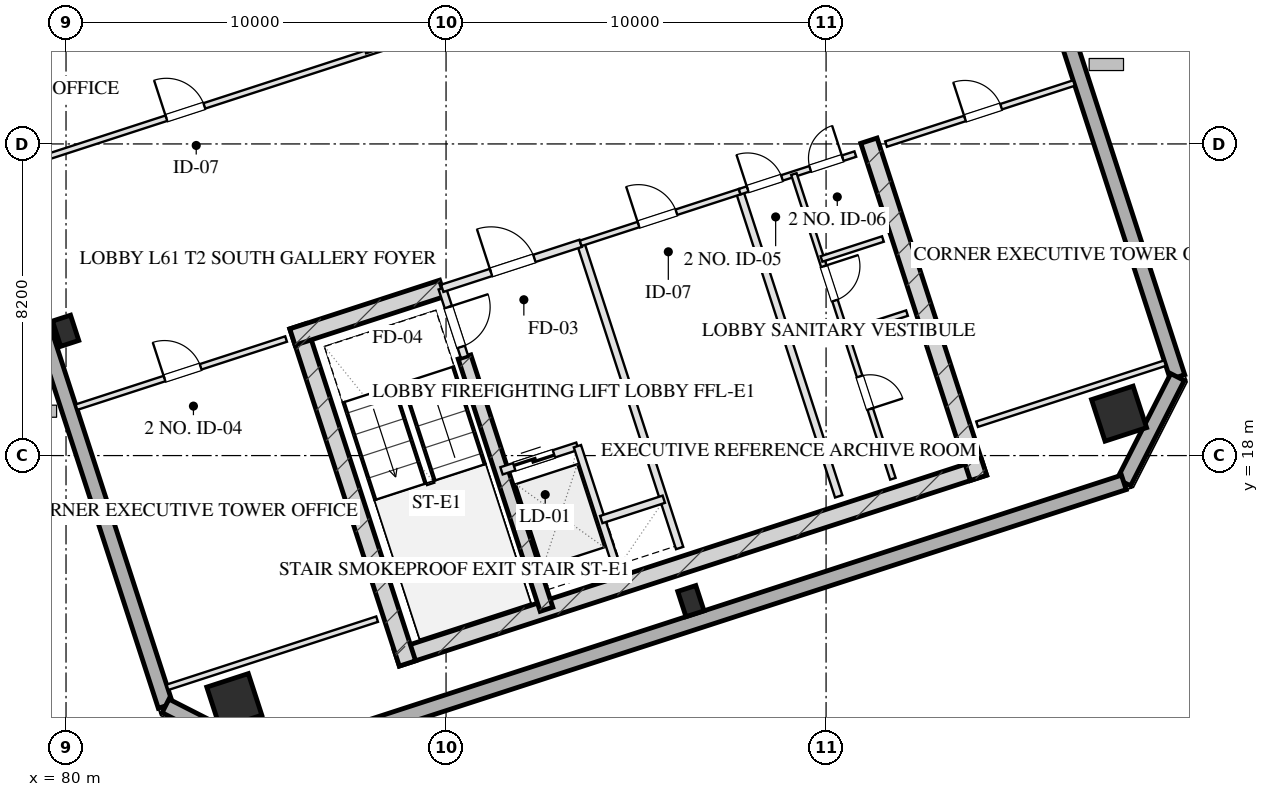
"""IFC4 building model, lengths in metres.
Left out: names, types, materials, properties, quantities, classifications, styles, units other than length and angle.
Written with IfcOpenShell. Run it as: python <this file> out.ifc"""

import sys

from ifc_helpers import new_model, si_unit, direction, frame, frame_2d, origin, origin_2d, place, context, subcontext, project, spatial, rectangle, hollow_rectangle, extrude, element, fill, save


model = new_model("IFC4")
c1 = context("Model", 3, precision=1e-05, world=origin(), true_north=direction((0.0, 1.0)))
c2 = subcontext(c1, "Body", "Model", "MODEL_VIEW")
j1 = project(units=[si_unit("LENGTHUNIT", "METRE"), si_unit("PLANEANGLEUNIT", "RADIAN")], contexts=[c1])
p1 = place(None, origin())
s1 = spatial("IfcSite", under=j1, at=p1, CompositionType="ELEMENT")
p2 = place(p1, origin())
s2 = spatial("IfcBuilding", under=s1, at=p2, CompositionType="ELEMENT")
p3 = place(p2, frame((0.0, 0.0, 226.55)))
s3 = spatial("IfcBuildingStorey", under=s2, at=p3, CompositionType="ELEMENT", Elevation=226.55)
p4 = place(p3, frame((88.701, 12.675, 0.0), z_axis=(0.0, 0.0, 1.0), x_axis=(0.95105824505, 0.309011673763, 0.0)))
e1 = element("IfcWall", 1, at=p4, inside=s3, PredefinedType="SHEAR", context=c2, shape_type="SweptSolid", body=[
    extrude(rectangle(XDim=16.25, YDim=0.45, at=frame_2d((8.125, 0.0))), origin(), (0.0, 0.0, 1.0), 3.45),
])
for number, where, z_axis, x_axis in (
    (2, (86.102, 21.404, 0.0), (0.0, 0.0, 1.0), (0.309, -0.951, 0.0)),
    (3, (101.128, 26.286, 0.0), (0.0, 0.0, 1.0), (0.309, -0.951, 0.0)),
):
    element("IfcWall", number, at=place(p3, frame(where, z_axis=z_axis, x_axis=x_axis)), inside=s3, PredefinedType="SHEAR", context=c2, shape_type="SweptSolid", body=[
        extrude(rectangle(XDim=9.33, YDim=0.45, at=frame_2d((4.665, 0.0))), origin(), (0.0, 0.0, 1.0), 3.45),
    ])
p5 = place(p3, frame((90.486, 20.594, 0.0), z_axis=(0.0, 0.0, 1.0), x_axis=(0.309020428229, -0.951055400562, 0.0)))
e4 = element("IfcWall", 4, at=p5, inside=s3, PredefinedType="SHEAR", context=c2, shape_type="SweptSolid", body=[
    extrude(rectangle(XDim=6.98, YDim=0.35, at=frame_2d((3.49, 0.0))), origin(), (0.0, 0.0, 1.0), 3.45),
])
p6 = place(p3, frame((85.957, 21.12, 0.0), z_axis=(0.0, 0.0, 1.0), x_axis=(0.951064796122, 0.308991510526, 0.0)))
e5 = element("IfcWall", 5, at=p6, inside=s3, PredefinedType="SHEAR", context=c2, shape_type="SweptSolid", body=[
    extrude(rectangle(XDim=4.145, YDim=0.45, at=frame_2d((2.073, 0.0))), origin(), (0.0, 0.0, 1.0), 3.45),
])
for number, where, z_axis, x_axis in (
    (6, (84.428, 11.539, 0.0), (0.0, 0.0, 1.0), (0.951, 0.309, 0.0)),
    (7, (107.71, 19.104, 0.0), (0.0, 0.0, 1.0), (0.951, 0.309, 0.0)),
):
    element("IfcColumn", number, at=place(p3, frame(where, z_axis=z_axis, x_axis=x_axis)), inside=s3, PredefinedType="COLUMN", context=c2, shape_type="SweptSolid", body=[
        extrude(hollow_rectangle(XDim=1.15, YDim=1.15, WallThickness=0.04, at=origin_2d()), origin(), (0.0, 0.0, 1.0), 3.451),
    ])
for number, where, z_axis, x_axis in (
    (8, (79.99, 21.284, 0.0), (0.0, 0.0, 1.0), (0.951, 0.309, 0.0)),
    (9, (96.443, 14.17, 0.0), (0.0, 0.0, 1.0), (0.951, 0.309, 0.0)),
):
    element("IfcColumn", number, at=place(p3, frame(where, z_axis=z_axis, x_axis=x_axis)), inside=s3, PredefinedType="COLUMN", context=c2, shape_type="SweptSolid", body=[
        extrude(hollow_rectangle(XDim=0.5, YDim=0.7, WallThickness=0.025, at=origin_2d()), origin(), (0.0, 0.0, 1.0), 3.451),
    ])
p7 = place(p3, frame((82.618, 11.414, 0.0), z_axis=(0.0, 0.0, 1.0), x_axis=(-0.309016491071, 0.951056679828, 0.0)))
e10 = element("IfcWall", 10, at=p7, inside=s3, PredefinedType="SOLIDWALL", context=c2, shape_type="SweptSolid", body=[
    extrude(rectangle(XDim=38.4, YDim=0.4, at=frame_2d((19.2, 0.0))), origin(), (0.0, 0.0, 1.0), 2.55),
])
p8 = place(p7, frame((11.825, 0.0, 0.75)))
e11 = element("IfcOpeningElement", 11, at=p8, cuts=e10, PredefinedType="OPENING", context=c2, shape_type="SweptSolid", body=[
    extrude(rectangle(XDim=1.95, YDim=1.4, at=frame_2d((0.975, 0.7))), frame((0.0, 0.21, 0.0), z_axis=(0.0, -1.0, 0.0), x_axis=(1.0, 0.0, 0.0)), (0.0, 0.0, 1.0), 0.42),
])
p9 = place(p7, frame((15.625, 0.0, 0.75)))
e12 = element("IfcOpeningElement", 12, at=p9, cuts=e10, PredefinedType="OPENING", context=c2, shape_type="SweptSolid", body=[
    extrude(rectangle(XDim=1.95, YDim=1.4, at=frame_2d((0.975, 0.7))), frame((0.0, 0.21, 0.0), z_axis=(0.0, -1.0, 0.0), x_axis=(1.0, 0.0, 0.0)), (0.0, 0.0, 1.0), 0.42),
])
p10 = place(p7, frame((21.5, 0.0, 0.0)))
e13 = element("IfcOpeningElement", 13, at=p10, cuts=e10, PredefinedType="OPENING", context=c2, shape_type="SweptSolid", body=[
    extrude(rectangle(XDim=1.1, YDim=2.15, at=frame_2d((0.55, 1.075))), frame((0.0, 0.21, 0.0), z_axis=(0.0, -1.0, 0.0), x_axis=(1.0, 0.0, 0.0)), (0.0, 0.0, 1.0), 0.42),
])
p11 = place(p3, frame((97.382, 56.586, 0.0), z_axis=(0.0, 0.0, 1.0), x_axis=(0.309016491071, -0.951056679828, 0.0)))
e14 = element("IfcWall", 14, at=p11, inside=s3, PredefinedType="SOLIDWALL", context=c2, shape_type="SweptSolid", body=[
    extrude(rectangle(XDim=38.4, YDim=0.4, at=frame_2d((19.2, 0.0))), origin(), (0.0, 0.0, 1.0), 2.55),
])
p12 = place(p11, frame((24.625, 0.0, 0.75)))
e15 = element("IfcOpeningElement", 15, at=p12, cuts=e14, PredefinedType="OPENING", context=c2, shape_type="SweptSolid", body=[
    extrude(rectangle(XDim=1.95, YDim=1.4, at=frame_2d((0.975, 0.7))), frame((0.0, 0.21, 0.0), z_axis=(0.0, -1.0, 0.0), x_axis=(1.0, 0.0, 0.0)), (0.0, 0.0, 1.0), 0.42),
])
p13 = place(p11, frame((20.825, 0.0, 0.75)))
e16 = element("IfcOpeningElement", 16, at=p13, cuts=e14, PredefinedType="OPENING", context=c2, shape_type="SweptSolid", body=[
    extrude(rectangle(XDim=1.95, YDim=1.4, at=frame_2d((0.975, 0.7))), frame((0.0, 0.21, 0.0), z_axis=(0.0, -1.0, 0.0), x_axis=(1.0, 0.0, 0.0)), (0.0, 0.0, 1.0), 0.42),
])
p14 = place(p11, frame((15.8, 0.0, 0.0)))
e17 = element("IfcOpeningElement", 17, at=p14, cuts=e14, PredefinedType="OPENING", context=c2, shape_type="SweptSolid", body=[
    extrude(rectangle(XDim=1.1, YDim=2.15, at=frame_2d((0.55, 1.075))), frame((0.0, 0.21, 0.0), z_axis=(0.0, -1.0, 0.0), x_axis=(1.0, 0.0, 0.0)), (0.0, 0.0, 1.0), 0.42),
])
p15 = place(p3, frame((109.248, 20.066, 0.0), z_axis=(0.0, 0.0, 1.0), x_axis=(-0.453949291228, -0.891027519774, 0.0)))
e18 = element("IfcWall", 18, at=p15, inside=s3, PredefinedType="SOLIDWALL", context=c2, shape_type="SweptSolid", body=[
    extrude(rectangle(XDim=3.111, YDim=0.4, at=frame_2d((1.556, 0.0))), origin(), (0.0, 0.0, 1.0), 2.55),
])
p16 = place(p3, frame((107.835, 17.294, 0.0), z_axis=(0.0, 0.0, 1.0), x_axis=(-0.951058012937, -0.309012388148, 0.0)))
e19 = element("IfcWall", 19, at=p16, inside=s3, PredefinedType="SOLIDWALL", context=c2, shape_type="SweptSolid", body=[
    extrude(rectangle(XDim=23.6, YDim=0.4, at=frame_2d((11.8, 0.0))), origin(), (0.0, 0.0, 1.0), 2.55),
])
p17 = place(p3, frame((85.39, 10.001, 0.0), z_axis=(0.0, 0.0, 1.0), x_axis=(-0.890979603174, 0.454043331334, 0.0)))
e20 = element("IfcWall", 20, at=p17, inside=s3, PredefinedType="SOLIDWALL", context=c2, shape_type="SweptSolid", body=[
    extrude(rectangle(XDim=3.111, YDim=0.4, at=frame_2d((1.556, 0.0))), origin(), (0.0, 0.0, 1.0), 2.55),
])
p18 = place(p3, frame((89.899, 22.401, 0.0), z_axis=(0.0, 0.0, 1.0), x_axis=(0.308932062672, -0.951084108086, 0.0)))
e21 = element("IfcWall", 21, at=p18, inside=s3, PredefinedType="PARTITIONING", context=c2, shape_type="SweptSolid", body=[
    extrude(rectangle(XDim=1.9, YDim=0.2, at=frame_2d((0.95, 0.0))), origin(), (0.0, 0.0, 1.0), 3.155),
])
p19 = place(p18, frame((0.52, 0.0, 0.0)))
e22 = element("IfcOpeningElement", 22, at=p19, cuts=e21, PredefinedType="OPENING", context=c2, shape_type="SweptSolid", body=[
    extrude(rectangle(XDim=1.1, YDim=2.05, at=frame_2d((0.55, 1.025))), frame((0.0, 0.11, 0.0), z_axis=(0.0, -1.0, 0.0), x_axis=(1.0, 0.0, 0.0)), (0.0, 0.0, 1.0), 0.22),
])
p20 = place(p3, frame((93.542, 23.585, 0.0), z_axis=(0.0, 0.0, 1.0), x_axis=(0.309042196757, -0.951048327176, 0.0)))
e23 = element("IfcWall", 23, at=p20, inside=s3, PredefinedType="PARTITIONING", context=c2, shape_type="SweptSolid", body=[
    extrude(rectangle(XDim=8.43, YDim=0.2, at=frame_2d((4.215, 0.0))), origin(), (0.0, 0.0, 1.0), 3.155),
])
p21 = place(p3, frame((89.899, 22.401, 0.0), z_axis=(0.0, 0.0, 1.0), x_axis=(0.951046716504, 0.309047153403, 0.0)))
e24 = element("IfcWall", 24, at=p21, inside=s3, PredefinedType="PARTITIONING", context=c2, shape_type="SweptSolid", body=[
    extrude(rectangle(XDim=3.83, YDim=0.2, at=frame_2d((1.915, 0.0))), origin(), (0.0, 0.0, 1.0), 3.155),
])
p22 = place(p21, frame((1.35, 0.0, 0.0)))
e25 = element("IfcOpeningElement", 25, at=p22, cuts=e24, PredefinedType="OPENING", context=c2, shape_type="SweptSolid", body=[
    extrude(rectangle(XDim=1.2, YDim=2.05, at=frame_2d((0.6, 1.025))), frame((0.0, 0.11, 0.0), z_axis=(0.0, -1.0, 0.0), x_axis=(1.0, 0.0, 0.0)), (0.0, 0.0, 1.0), 0.22),
])
p23 = place(p3, frame((91.46, 17.598, 0.0), z_axis=(0.0, 0.0, 1.0), x_axis=(0.951062257173, 0.308999325213, 0.0)))
e26 = element("IfcWall", 26, at=p23, inside=s3, PredefinedType="PARTITIONING", context=c2, shape_type="SweptSolid", body=[
    extrude(rectangle(XDim=2.1, YDim=0.2, at=frame_2d((1.05, 0.0))), origin(), (0.0, 0.0, 1.0), 3.155),
])
p24 = place(p23, frame((0.35, 0.0, 0.0)))
e27 = element("IfcOpeningElement", 27, at=p24, cuts=e26, PredefinedType="OPENING", context=c2, shape_type="SweptSolid", body=[
    extrude(rectangle(XDim=1.1, YDim=2.05, at=frame_2d((0.55, 1.025))), frame((0.0, 0.11, 0.0), z_axis=(0.0, -1.0, 0.0), x_axis=(1.0, 0.0, 0.0)), (0.0, 0.0, 1.0), 0.22),
])
p25 = place(p3, frame((93.457, 18.247, 0.0), z_axis=(0.0, 0.0, 1.0), x_axis=(0.3089935693, -0.951064127245, 0.0)))
e28 = element("IfcWall", 28, at=p25, inside=s3, PredefinedType="PARTITIONING", context=c2, shape_type="SweptSolid", body=[
    extrude(rectangle(XDim=3.7, YDim=0.2, at=frame_2d((1.85, 0.0))), origin(), (0.0, 0.0, 1.0), 3.155),
])
p26 = place(p3, frame((94.084, 16.317, 0.0), z_axis=(0.0, 0.0, 1.0), x_axis=(0.951041328149, 0.309063734775, 0.0)))
e29 = element("IfcWall", 29, at=p26, inside=s3, PredefinedType="PARTITIONING", context=c2, shape_type="SweptSolid", body=[
    extrude(rectangle(XDim=1.73, YDim=0.2, at=frame_2d((0.865, 0.0))), origin(), (0.0, 0.0, 1.0), 3.155),
])
p27 = place(p3, frame((97.727, 24.944, 0.0), z_axis=(0.0, 0.0, 1.0), x_axis=(0.309016001439, -0.951056838919, 0.0)))
e30 = element("IfcWall", 30, at=p27, inside=s3, PredefinedType="PARTITIONING", context=c2, shape_type="SweptSolid", body=[
    extrude(rectangle(XDim=8.43, YDim=0.2, at=frame_2d((4.215, 0.0))), origin(), (0.0, 0.0, 1.0), 3.155),
])
p28 = place(p3, frame((93.542, 23.585, 0.0), z_axis=(0.0, 0.0, 1.0), x_axis=(0.951063829732, 0.308994485023, 0.0)))
e31 = element("IfcWall", 31, at=p28, inside=s3, PredefinedType="PARTITIONING", context=c2, shape_type="SweptSolid", body=[
    extrude(rectangle(XDim=4.4, YDim=0.15, at=frame_2d((2.2, 0.0))), origin(), (0.0, 0.0, 1.0), 3.155),
])
p29 = place(p28, frame((1.6, 0.0, 0.0)))
e32 = element("IfcOpeningElement", 32, at=p29, cuts=e31, PredefinedType="OPENING", context=c2, shape_type="SweptSolid", body=[
    extrude(rectangle(XDim=1.05, YDim=2.05, at=frame_2d((0.525, 1.025))), frame((0.0, 0.085, 0.0), z_axis=(0.0, -1.0, 0.0), x_axis=(1.0, 0.0, 0.0)), (0.0, 0.0, 1.0), 0.17),
])
p30 = place(p3, frame((97.727, 24.944, 0.0), z_axis=(0.0, 0.0, 1.0), x_axis=(0.951036872128, 0.309077446369, 0.0)))
e33 = element("IfcWall", 33, at=p30, inside=s3, PredefinedType="PARTITIONING", context=c2, shape_type="SweptSolid", body=[
    extrude(rectangle(XDim=3.2, YDim=0.15, at=frame_2d((1.6, 0.0))), origin(), (0.0, 0.0, 1.0), 3.155),
])
p31 = place(p30, frame((0.22, 0.0, 0.0)))
e34 = element("IfcOpeningElement", 34, at=p31, cuts=e33, PredefinedType="OPENING", context=c2, shape_type="SweptSolid", body=[
    extrude(rectangle(XDim=0.95, YDim=2.05, at=frame_2d((0.475, 1.025))), frame((0.0, 0.085, 0.0), z_axis=(0.0, -1.0, 0.0), x_axis=(1.0, 0.0, 0.0)), (0.0, 0.0, 1.0), 0.17),
])
p32 = place(p30, frame((1.95, 0.0, 0.0)))
e35 = element("IfcOpeningElement", 35, at=p32, cuts=e33, PredefinedType="OPENING", context=c2, shape_type="SweptSolid", body=[
    extrude(rectangle(XDim=0.9, YDim=2.05, at=frame_2d((0.45, 1.025))), frame((0.0, 0.085, 0.0), z_axis=(0.0, -1.0, 0.0), x_axis=(1.0, 0.0, 0.0)), (0.0, 0.0, 1.0), 0.17),
])
p33 = place(p3, frame((99.153, 25.408, 0.0), z_axis=(0.0, 0.0, 1.0), x_axis=(0.309016001439, -0.951056838919, 0.0)))
e36 = element("IfcWall", 36, at=p33, inside=s3, PredefinedType="PARTITIONING", context=c2, shape_type="SweptSolid", body=[
    extrude(rectangle(XDim=8.43, YDim=0.15, at=frame_2d((4.215, 0.0))), origin(), (0.0, 0.0, 1.0), 3.155),
])
p34 = place(p33, frame((2.55, 0.0, 0.0)))
e37 = element("IfcOpeningElement", 37, at=p34, cuts=e36, PredefinedType="OPENING", context=c2, shape_type="SweptSolid", body=[
    extrude(rectangle(XDim=0.95, YDim=2.05, at=frame_2d((0.475, 1.025))), frame((0.0, 0.085, 0.0), z_axis=(0.0, -1.0, 0.0), x_axis=(1.0, 0.0, 0.0)), (0.0, 0.0, 1.0), 0.17),
])
p35 = place(p33, frame((5.6, 0.0, 0.0)))
e38 = element("IfcOpeningElement", 38, at=p35, cuts=e36, PredefinedType="OPENING", context=c2, shape_type="SweptSolid", body=[
    extrude(rectangle(XDim=0.9, YDim=2.05, at=frame_2d((0.45, 1.025))), frame((0.0, 0.085, 0.0), z_axis=(0.0, -1.0, 0.0), x_axis=(1.0, 0.0, 0.0)), (0.0, 0.0, 1.0), 0.17),
])
for number, where, z_axis, x_axis in (
    (39, (100.513, 21.223, 0.0), (0.0, 0.0, 1.0), (0.951, 0.309, 0.0)),
    (40, (99.879, 23.173, 0.0), (0.0, 0.0, 1.0), (0.951, 0.309, 0.0)),
):
    element("IfcWall", number, at=place(p3, frame(where, z_axis=z_axis, x_axis=x_axis)), inside=s3, PredefinedType="PARTITIONING", context=c2, shape_type="SweptSolid", body=[
        extrude(rectangle(XDim=1.7, YDim=0.15, at=frame_2d((0.85, 0.0))), origin(), (0.0, 0.0, 1.0), 3.155),
    ])
p36 = place(p3, frame((82.669, 11.903, 0.0), z_axis=(0.0, 0.0, 1.0), x_axis=(0.951059431056, 0.309008023519, 0.0)))
e41 = element("IfcWall", 41, at=p36, inside=s3, PredefinedType="PARTITIONING", context=c2, shape_type="SweptSolid", body=[
    extrude(rectangle(XDim=5.8, YDim=0.15, at=frame_2d((2.9, 0.0))), origin(), (0.0, 0.0, 1.0), 3.155),
])
p37 = place(p3, frame((80.275, 19.274, 0.0), z_axis=(0.0, 0.0, 1.0), x_axis=(0.951059431056, 0.309008023519, 0.0)))
e42 = element("IfcWall", 42, at=p37, inside=s3, PredefinedType="PARTITIONING", context=c2, shape_type="SweptSolid", body=[
    extrude(rectangle(XDim=5.8, YDim=0.15, at=frame_2d((2.9, 0.0))), origin(), (0.0, 0.0, 1.0), 3.155),
])
p38 = place(p37, frame((2.436, 0.0, 0.0)))
e43 = element("IfcOpeningElement", 43, at=p38, cuts=e42, PredefinedType="OPENING", context=c2, shape_type="SweptSolid", body=[
    extrude(rectangle(XDim=1.0, YDim=2.05, at=frame_2d((0.5, 1.025))), frame((0.0, 0.085, 0.0), z_axis=(0.0, -1.0, 0.0), x_axis=(1.0, 0.0, 0.0)), (0.0, 0.0, 1.0), 0.17),
])
p39 = place(p3, frame((103.973, 18.825, 0.0), z_axis=(0.0, 0.0, 1.0), x_axis=(0.951055112834, 0.309021313752, 0.0)))
e44 = element("IfcWall", 44, at=p39, inside=s3, PredefinedType="PARTITIONING", context=c2, shape_type="SweptSolid", body=[
    extrude(rectangle(XDim=5.2, YDim=0.15, at=frame_2d((2.6, 0.0))), origin(), (0.0, 0.0, 1.0), 3.155),
])
p40 = place(p3, frame((101.578, 26.196, 0.0), z_axis=(0.0, 0.0, 1.0), x_axis=(0.951064427824, 0.308992644131, 0.0)))
e45 = element("IfcWall", 45, at=p40, inside=s3, PredefinedType="PARTITIONING", context=c2, shape_type="SweptSolid", body=[
    extrude(rectangle(XDim=5.2, YDim=0.15, at=frame_2d((2.6, 0.0))), origin(), (0.0, 0.0, 1.0), 3.155),
])
p41 = place(p40, frame((2.184, 0.0, 0.0)))
e46 = element("IfcOpeningElement", 46, at=p41, cuts=e45, PredefinedType="OPENING", context=c2, shape_type="SweptSolid", body=[
    extrude(rectangle(XDim=1.0, YDim=2.05, at=frame_2d((0.5, 1.025))), frame((0.0, 0.085, 0.0), z_axis=(0.0, -1.0, 0.0), x_axis=(1.0, 0.0, 0.0)), (0.0, 0.0, 1.0), 0.17),
])
p42 = place(p3, frame((78.266, 25.456, 0.0), z_axis=(0.0, 0.0, 1.0), x_axis=(0.951056617779, 0.30901668204, 0.0)))
e47 = element("IfcWall", 47, at=p42, inside=s3, PredefinedType="PARTITIONING", context=c2, shape_type="SweptSolid", body=[
    extrude(rectangle(XDim=15.275, YDim=0.15, at=frame_2d((7.637, 0.0))), origin(), (0.0, 0.0, 1.0), 3.155),
])
p43 = place(p42, frame((4.6, 0.0, 0.0)))
e48 = element("IfcOpeningElement", 48, at=p43, cuts=e47, PredefinedType="OPENING", context=c2, shape_type="SweptSolid", body=[
    extrude(rectangle(XDim=1.05, YDim=2.05, at=frame_2d((0.525, 1.025))), frame((0.0, 0.085, 0.0), z_axis=(0.0, -1.0, 0.0), x_axis=(1.0, 0.0, 0.0)), (0.0, 0.0, 1.0), 0.17),
])
p44 = place(p3, frame((87.967, 28.608, 0.0), z_axis=(0.0, 0.0, 1.0), x_axis=(-0.309004845045, 0.951060463766, 0.0)))
e49 = element("IfcWall", 49, at=p44, inside=s3, PredefinedType="PARTITIONING", context=c2, shape_type="SweptSolid", body=[
    extrude(rectangle(XDim=3.33, YDim=0.15, at=frame_2d((1.665, 0.0))), origin(), (0.0, 0.0, 1.0), 3.155),
])
p45 = place(p3, frame((77.237, 28.623, 0.0), z_axis=(0.0, 0.0, 1.0), x_axis=(0.951056617779, 0.30901668204, 0.0)))
e50 = element("IfcWall", 50, at=p45, inside=s3, PredefinedType="PARTITIONING", context=c2, shape_type="SweptSolid", body=[
    extrude(rectangle(XDim=15.275, YDim=0.15, at=frame_2d((7.637, 0.0))), origin(), (0.0, 0.0, 1.0), 3.155),
])
p46 = place(p19, origin())
e51 = element("IfcDoor", 51, at=p46, inside=s3, OperationType="SINGLE_SWING_LEFT", PredefinedType="DOOR", context=c2, shape_type="SweptSolid", body=[
    extrude(rectangle(XDim=1.1, YDim=2.05, at=frame_2d((0.55, 1.025))), frame((0.0, 0.025, 0.0), z_axis=(0.0, -1.0, 0.0), x_axis=(1.0, 0.0, 0.0)), (0.0, 0.0, 1.0), 0.05),
])
fill(e22, e51)
p47 = place(p22, origin())
e52 = element("IfcDoor", 52, at=p47, inside=s3, OperationType="SINGLE_SWING_LEFT", PredefinedType="DOOR", context=c2, shape_type="SweptSolid", body=[
    extrude(rectangle(XDim=1.2, YDim=2.05, at=frame_2d((0.6, 1.025))), frame((0.0, 0.025, 0.0), z_axis=(0.0, -1.0, 0.0), x_axis=(1.0, 0.0, 0.0)), (0.0, 0.0, 1.0), 0.05),
])
fill(e25, e52)
p48 = place(p24, origin())
e53 = element("IfcDoor", 53, at=p48, inside=s3, OperationType="DOUBLE_DOOR_SLIDING", PredefinedType="DOOR", context=c2, shape_type="SweptSolid", body=[
    extrude(rectangle(XDim=1.1, YDim=2.05, at=frame_2d((0.55, 1.025))), frame((0.0, 0.025, 0.0), z_axis=(0.0, -1.0, 0.0), x_axis=(1.0, 0.0, 0.0)), (0.0, 0.0, 1.0), 0.05),
])
fill(e27, e53)
p49 = place(p29, origin())
e54 = element("IfcDoor", 54, at=p49, inside=s3, OperationType="SINGLE_SWING_LEFT", PredefinedType="DOOR", context=c2, shape_type="SweptSolid", body=[
    extrude(rectangle(XDim=1.05, YDim=2.05, at=frame_2d((0.525, 1.025))), frame((0.0, 0.025, 0.0), z_axis=(0.0, -1.0, 0.0), x_axis=(1.0, 0.0, 0.0)), (0.0, 0.0, 1.0), 0.05),
])
fill(e32, e54)
p50 = place(p31, origin())
e55 = element("IfcDoor", 55, at=p50, inside=s3, OperationType="SINGLE_SWING_LEFT", PredefinedType="DOOR", context=c2, shape_type="SweptSolid", body=[
    extrude(rectangle(XDim=0.95, YDim=2.05, at=frame_2d((0.475, 1.025))), frame((0.0, 0.025, 0.0), z_axis=(0.0, -1.0, 0.0), x_axis=(1.0, 0.0, 0.0)), (0.0, 0.0, 1.0), 0.05),
])
fill(e34, e55)
p51 = place(p32, origin())
e56 = element("IfcDoor", 56, at=p51, inside=s3, OperationType="SINGLE_SWING_RIGHT", PredefinedType="DOOR", context=c2, shape_type="SweptSolid", body=[
    extrude(rectangle(XDim=0.9, YDim=2.05, at=frame_2d((0.45, 1.025))), frame((0.0, 0.025, 0.0), z_axis=(0.0, -1.0, 0.0), x_axis=(1.0, 0.0, 0.0)), (0.0, 0.0, 1.0), 0.05),
])
fill(e35, e56)
p52 = place(p34, origin())
e57 = element("IfcDoor", 57, at=p52, inside=s3, OperationType="SINGLE_SWING_LEFT", PredefinedType="DOOR", context=c2, shape_type="SweptSolid", body=[
    extrude(rectangle(XDim=0.95, YDim=2.05, at=frame_2d((0.475, 1.025))), frame((0.0, 0.025, 0.0), z_axis=(0.0, -1.0, 0.0), x_axis=(1.0, 0.0, 0.0)), (0.0, 0.0, 1.0), 0.05),
])
fill(e37, e57)
p53 = place(p35, origin())
e58 = element("IfcDoor", 58, at=p53, inside=s3, OperationType="SINGLE_SWING_RIGHT", PredefinedType="DOOR", context=c2, shape_type="SweptSolid", body=[
    extrude(rectangle(XDim=0.9, YDim=2.05, at=frame_2d((0.45, 1.025))), frame((0.0, 0.025, 0.0), z_axis=(0.0, -1.0, 0.0), x_axis=(1.0, 0.0, 0.0)), (0.0, 0.0, 1.0), 0.05),
])
fill(e38, e58)
p54 = place(p38, origin())
e59 = element("IfcDoor", 59, at=p54, inside=s3, OperationType="SINGLE_SWING_LEFT", PredefinedType="DOOR", context=c2, shape_type="SweptSolid", body=[
    extrude(rectangle(XDim=1.0, YDim=2.05, at=frame_2d((0.5, 1.025))), frame((0.0, 0.025, 0.0), z_axis=(0.0, -1.0, 0.0), x_axis=(1.0, 0.0, 0.0)), (0.0, 0.0, 1.0), 0.05),
])
fill(e43, e59)
p55 = place(p41, origin())
e60 = element("IfcDoor", 60, at=p55, inside=s3, OperationType="SINGLE_SWING_LEFT", PredefinedType="DOOR", context=c2, shape_type="SweptSolid", body=[
    extrude(rectangle(XDim=1.0, YDim=2.05, at=frame_2d((0.5, 1.025))), frame((0.0, 0.025, 0.0), z_axis=(0.0, -1.0, 0.0), x_axis=(1.0, 0.0, 0.0)), (0.0, 0.0, 1.0), 0.05),
])
fill(e46, e60)
p56 = place(p43, origin())
e61 = element("IfcDoor", 61, at=p56, inside=s3, OperationType="SINGLE_SWING_LEFT", PredefinedType="DOOR", context=c2, shape_type="SweptSolid", body=[
    extrude(rectangle(XDim=1.05, YDim=2.05, at=frame_2d((0.525, 1.025))), frame((0.0, 0.025, 0.0), z_axis=(0.0, -1.0, 0.0), x_axis=(1.0, 0.0, 0.0)), (0.0, 0.0, 1.0), 0.05),
])
fill(e48, e61)
save(model, sys.argv[1])
